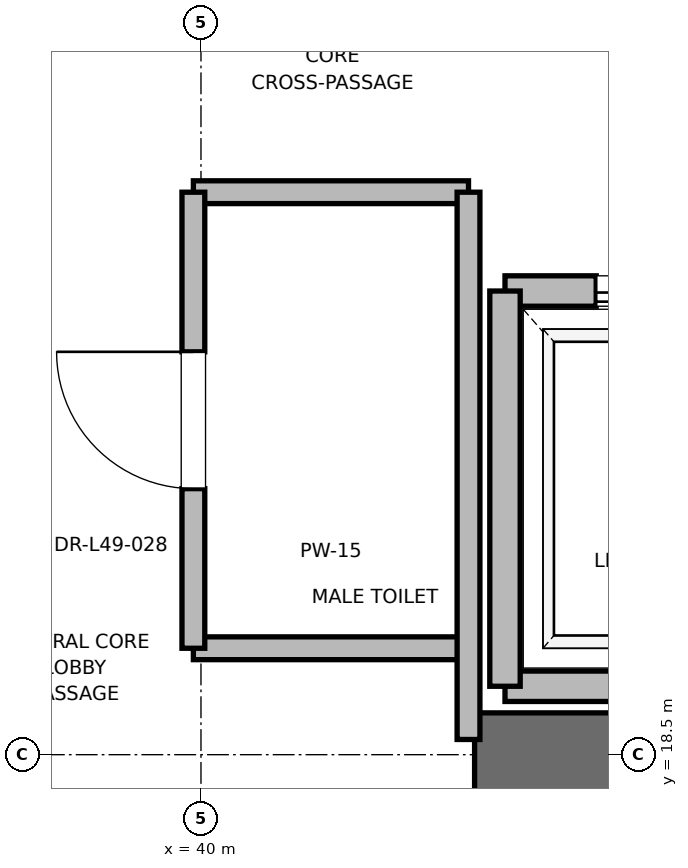
"""IFC4 building model, lengths in metres.
Left out: names, types, materials, properties, quantities, classifications, styles, units other than length and angle.
Written with IfcOpenShell. Run it as: python <this file> out.ifc"""

import sys

from ifc_helpers import new_model, si_unit, direction, frame, frame_2d, origin, place, context, subcontext, project, spatial, rectangle, extrude, element, fill, save


model = new_model("IFC4")
c1 = context("Model", 3, precision=1e-05, world=origin(), true_north=direction((0.0, 1.0)))
c2 = subcontext(c1, "Body", "Model", "MODEL_VIEW")
j1 = project(units=[si_unit("LENGTHUNIT", "METRE"), si_unit("PLANEANGLEUNIT", "RADIAN")], contexts=[c1])
p1 = place(None, origin())
s1 = spatial("IfcSite", under=j1, at=p1, CompositionType="ELEMENT")
p2 = place(p1, origin())
s2 = spatial("IfcBuilding", under=s1, at=p2, CompositionType="ELEMENT")
p3 = place(p2, frame((0.0, 0.0, 213.2)))
s3 = spatial("IfcBuildingStorey", under=s2, at=p3, CompositionType="ELEMENT", Elevation=213.2)
p4 = place(p3, frame((41.8, 18.5, 0.0), z_axis=(0.0, 0.0, 1.0), x_axis=(1.0, 0.0, 0.0)))
e1 = element("IfcWall", 1, at=p4, inside=s3, PredefinedType="SHEAR", context=c2, shape_type="SweptSolid", body=[
    extrude(rectangle(XDim=9.2, YDim=0.55, at=frame_2d((4.6, 0.0))), origin(), (0.0, 0.0, 1.0), 3.775),
])
p5 = place(p3, frame((42.0, 18.95, 0.0), z_axis=(0.0, 0.0, 1.0), x_axis=(1.0, 0.0, 0.0)))
e2 = element("IfcWall", 2, at=p5, inside=s3, PredefinedType="SOLIDWALL", context=c2, shape_type="SweptSolid", body=[
    extrude(rectangle(XDim=2.3, YDim=0.2, at=frame_2d((1.15, 0.0))), origin(), (0.0, 0.0, 1.0), 2.755),
])
p6 = place(p3, frame((44.3, 21.55, 0.0), z_axis=(0.0, 0.0, 1.0), x_axis=(-1.0, 0.0, 0.0)))
e3 = element("IfcWall", 3, at=p6, inside=s3, PredefinedType="SOLIDWALL", context=c2, shape_type="SweptSolid", body=[
    extrude(rectangle(XDim=2.3, YDim=0.2, at=frame_2d((1.15, 0.0))), origin(), (0.0, 0.0, 1.0), 3.775),
])
p7 = place(p6, frame((0.6, 0.0, 0.0)))
e4 = element("IfcOpeningElement", 4, at=p7, cuts=e3, PredefinedType="OPENING", context=c2, shape_type="SweptSolid", body=[
    extrude(rectangle(XDim=1.1, YDim=2.2, at=frame_2d((0.55, 1.1))), frame((0.0, 0.1, 0.0), z_axis=(0.0, -1.0, 0.0), x_axis=(1.0, 0.0, 0.0)), (0.0, 0.0, 1.0), 0.2),
])
p8 = place(p3, frame((42.0, 21.55, 0.0), z_axis=(0.0, 0.0, 1.0), x_axis=(0.0, -1.0, 0.0)))
e5 = element("IfcWall", 5, at=p8, inside=s3, PredefinedType="SOLIDWALL", context=c2, shape_type="SweptSolid", body=[
    extrude(rectangle(XDim=2.6, YDim=0.2, at=frame_2d((1.3, 0.0))), origin(), (0.0, 0.0, 1.0), 2.755),
])
for number, where, z_axis, x_axis in (
    (6, (39.95, 19.2, 0.0), (0.0, 0.0, 1.0), (1.0, 0.0, 0.0)),
    (7, (39.95, 22.2, 0.0), (0.0, 0.0, 1.0), (1.0, 0.0, 0.0)),
):
    element("IfcWall", number, at=place(p3, frame(where, z_axis=z_axis, x_axis=x_axis)), inside=s3, PredefinedType="PARTITIONING", context=c2, shape_type="SweptSolid", body=[
        extrude(rectangle(XDim=1.81, YDim=0.15, at=frame_2d((0.905, 0.0))), origin(), (0.0, 0.0, 1.0), 2.85),
    ])
p9 = place(p3, frame((41.76, 18.6, 0.0), z_axis=(0.0, 0.0, 1.0), x_axis=(0.0, 1.0, 0.0)))
e8 = element("IfcWall", 8, at=p9, inside=s3, PredefinedType="PARTITIONING", context=c2, shape_type="SweptSolid", body=[
    extrude(rectangle(XDim=3.6, YDim=0.15, at=frame_2d((1.8, 0.0))), origin(), (0.0, 0.0, 1.0), 2.755),
])
p10 = place(p3, frame((39.95, 19.2, 0.0), z_axis=(0.0, 0.0, 1.0), x_axis=(0.0, 1.0, 0.0)))
e9 = element("IfcWall", 9, at=p10, inside=s3, PredefinedType="PARTITIONING", context=c2, shape_type="SweptSolid", body=[
    extrude(rectangle(XDim=3.0, YDim=0.15, at=frame_2d((1.5, 0.0))), origin(), (0.0, 0.0, 1.0), 2.85),
])
p11 = place(p10, frame((1.05, 0.0, 0.0)))
e10 = element("IfcOpeningElement", 10, at=p11, cuts=e9, PredefinedType="OPENING", context=c2, shape_type="SweptSolid", body=[
    extrude(rectangle(XDim=0.9, YDim=2.1, at=frame_2d((0.45, 1.05))), frame((0.0, 0.075, 0.0), z_axis=(0.0, -1.0, 0.0), x_axis=(1.0, 0.0, 0.0)), (0.0, 0.0, 1.0), 0.15),
])
p12 = place(p7, origin())
e11 = element("IfcDoor", 11, at=p12, inside=s3, OperationType="SLIDING_TO_RIGHT", PredefinedType="DOOR", context=c2, shape_type="SweptSolid", body=[
    extrude(rectangle(XDim=1.1, YDim=2.2, at=frame_2d((0.55, 1.1))), frame((0.0, 0.025, 0.0), z_axis=(0.0, -1.0, 0.0), x_axis=(1.0, 0.0, 0.0)), (0.0, 0.0, 1.0), 0.05),
])
fill(e4, e11)
p13 = place(p11, origin())
e12 = element("IfcDoor", 12, at=p13, inside=s3, OperationType="SINGLE_SWING_RIGHT", PredefinedType="DOOR", context=c2, shape_type="SweptSolid", body=[
    extrude(rectangle(XDim=0.9, YDim=2.1, at=frame_2d((0.45, 1.05))), frame((0.0, 0.025, 0.0), z_axis=(0.0, -1.0, 0.0), x_axis=(1.0, 0.0, 0.0)), (0.0, 0.0, 1.0), 0.05),
])
fill(e10, e12)
save(model, sys.argv[1])
